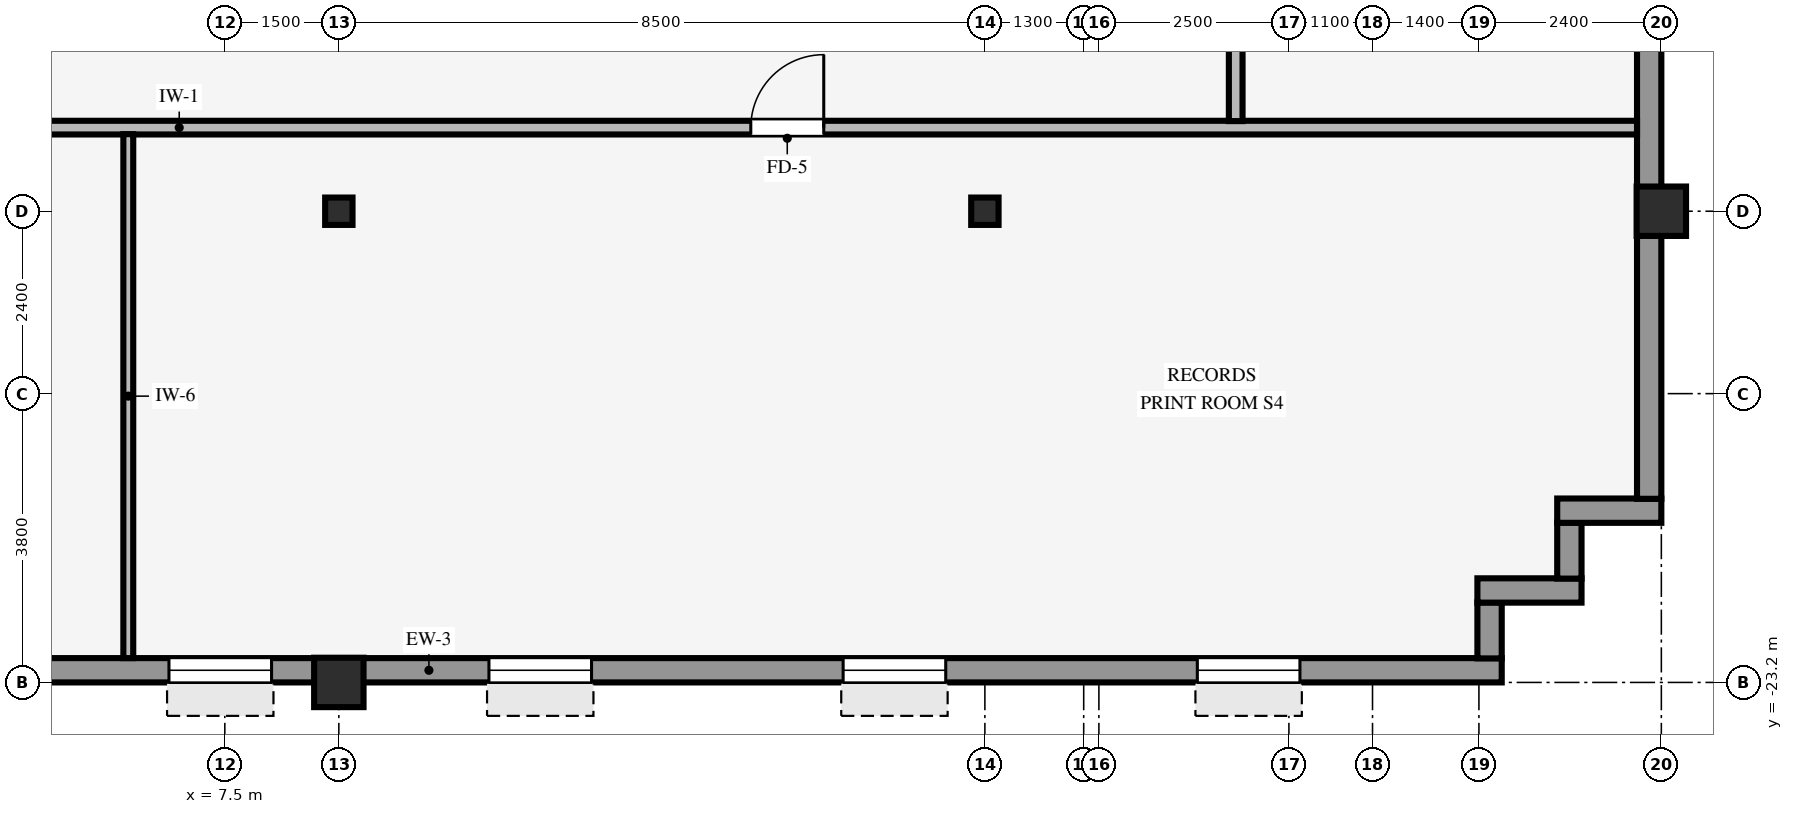
"""IFC4 building model, lengths in metres.
Left out: names, types, materials, properties, quantities, classifications, styles, units other than length and angle.
Written with IfcOpenShell. Run it as: python <this file> out.ifc"""

import sys

from ifc_helpers import new_model, si_unit, direction, frame, frame_2d, origin, origin_2d, place, context, subcontext, project, spatial, rectangle, hollow_rectangle, i_section, extrude, source, transform, mapped, element, fill, save


model = new_model("IFC4")
c1 = context("Model", 3, precision=1e-05, world=origin(), true_north=direction((0.0, 1.0)))
c2 = subcontext(c1, "Body", "Model", "MODEL_VIEW")
j1 = project(units=[si_unit("LENGTHUNIT", "METRE"), si_unit("PLANEANGLEUNIT", "RADIAN")], contexts=[c1])
p1 = place(None, origin())
s1 = spatial("IfcSite", under=j1, at=p1, CompositionType="ELEMENT")
p2 = place(p1, origin())
s2 = spatial("IfcBuilding", under=s1, at=p2, CompositionType="ELEMENT")
p3 = place(p2, frame((0.0, 0.0, 149.4)))
s3 = spatial("IfcBuildingStorey", under=s2, at=p3, CompositionType="ELEMENT", Elevation=149.4)
for number, where, z_axis, x_axis in (
    (1, (26.4, -17.0, 0.0), (0.0, 0.0, 1.0), (1.0, 0.0, 0.0)),
    (2, (9.0, -23.2, 0.0), (0.0, 0.0, 1.0), (1.0, 0.0, 0.0)),
):
    element("IfcColumn", number, at=place(p3, frame(where, z_axis=z_axis, x_axis=x_axis)), inside=s3, PredefinedType="COLUMN", context=c2, shape_type="SweptSolid", body=[
        extrude(hollow_rectangle(XDim=0.65, YDim=0.65, WallThickness=0.04, InnerFilletRadius=0.04, OuterFilletRadius=0.08, at=origin_2d()), origin(), (0.0, 0.0, 1.0), 3.37),
    ])
for number, where, z_axis, x_axis in (
    (3, (9.0, -17.0, 0.0), (0.0, 0.0, 1.0), (1.0, 0.0, 0.0)),
    (4, (17.5, -17.0, 0.0), (0.0, 0.0, 1.0), (1.0, 0.0, 0.0)),
):
    element("IfcColumn", number, at=place(p3, frame(where, z_axis=z_axis, x_axis=x_axis)), inside=s3, PredefinedType="COLUMN", context=c2, shape_type="SweptSolid", body=[
        extrude(i_section(OverallWidth=0.36, OverallDepth=0.36, WebThickness=0.021, FlangeThickness=0.021, FilletRadius=0.018, at=origin_2d()), origin(), (0.0, 0.0, 1.0), 3.37),
    ])
p4 = place(p3, frame((-24.3, -23.04, 0.0), z_axis=(0.0, 0.0, 1.0), x_axis=(1.0, 0.0, 0.0)))
e5 = element("IfcWall", 5, at=p4, inside=s3, PredefinedType="STANDARD", context=c2, shape_type="SweptSolid", body=[
    extrude(rectangle(XDim=48.6, YDim=0.32, at=frame_2d((24.3, 0.0))), origin(), (0.0, 0.0, 1.0), 2.705),
])
p5 = place(p4, frame((19.95, 0.0, 0.0), z_axis=(0.0, 0.0, 1.0), x_axis=(-1.0, 0.0, 0.0)))
e6 = element("IfcOpeningElement", 6, at=p5, cuts=e5, PredefinedType="OPENING", context=c2, shape_type="SweptSolid", body=[
    extrude(rectangle(XDim=1.05, YDim=2.1, at=frame_2d((0.525, 1.05))), frame((0.0, 0.17, 0.0), z_axis=(0.0, -1.0, 0.0), x_axis=(1.0, 0.0, 0.0)), (0.0, 0.0, 1.0), 0.34),
])
p6 = place(p4, frame((2.655, 0.0, 0.8)))
e7 = element("IfcOpeningElement", 7, at=p6, cuts=e5, PredefinedType="OPENING", context=c2, shape_type="SweptSolid", body=[
    extrude(rectangle(XDim=1.35, YDim=1.56, at=frame_2d((0.675, 0.78))), frame((0.0, 0.17, 0.0), z_axis=(0.0, -1.0, 0.0), x_axis=(1.0, 0.0, 0.0)), (0.0, 0.0, 1.0), 0.34),
])
p7 = place(p4, frame((7.315, 0.0, 0.8)))
e8 = element("IfcOpeningElement", 8, at=p7, cuts=e5, PredefinedType="OPENING", context=c2, shape_type="SweptSolid", body=[
    extrude(rectangle(XDim=1.35, YDim=1.56, at=frame_2d((0.675, 0.78))), frame((0.0, 0.17, 0.0), z_axis=(0.0, -1.0, 0.0), x_axis=(1.0, 0.0, 0.0)), (0.0, 0.0, 1.0), 0.34),
])
p8 = place(p4, frame((11.975, 0.0, 0.8)))
e9 = element("IfcOpeningElement", 9, at=p8, cuts=e5, PredefinedType="OPENING", context=c2, shape_type="SweptSolid", body=[
    extrude(rectangle(XDim=1.35, YDim=1.56, at=frame_2d((0.675, 0.78))), frame((0.0, 0.17, 0.0), z_axis=(0.0, -1.0, 0.0), x_axis=(1.0, 0.0, 0.0)), (0.0, 0.0, 1.0), 0.34),
])
p9 = place(p4, frame((21.295, 0.0, 0.8)))
e10 = element("IfcOpeningElement", 10, at=p9, cuts=e5, PredefinedType="OPENING", context=c2, shape_type="SweptSolid", body=[
    extrude(rectangle(XDim=1.35, YDim=1.56, at=frame_2d((0.675, 0.78))), frame((0.0, 0.17, 0.0), z_axis=(0.0, -1.0, 0.0), x_axis=(1.0, 0.0, 0.0)), (0.0, 0.0, 1.0), 0.34),
])
p10 = place(p4, frame((25.955, 0.0, 0.8)))
e11 = element("IfcOpeningElement", 11, at=p10, cuts=e5, PredefinedType="OPENING", context=c2, shape_type="SweptSolid", body=[
    extrude(rectangle(XDim=1.35, YDim=1.56, at=frame_2d((0.675, 0.78))), frame((0.0, 0.17, 0.0), z_axis=(0.0, -1.0, 0.0), x_axis=(1.0, 0.0, 0.0)), (0.0, 0.0, 1.0), 0.34),
])
p11 = place(p4, frame((31.065, 0.0, 0.8)))
e12 = element("IfcOpeningElement", 12, at=p11, cuts=e5, PredefinedType="OPENING", context=c2, shape_type="SweptSolid", body=[
    extrude(rectangle(XDim=1.35, YDim=1.56, at=frame_2d((0.675, 0.78))), frame((0.0, 0.17, 0.0), z_axis=(0.0, -1.0, 0.0), x_axis=(1.0, 0.0, 0.0)), (0.0, 0.0, 1.0), 0.34),
])
p12 = place(p4, frame((35.275, 0.0, 0.8)))
e13 = element("IfcOpeningElement", 13, at=p12, cuts=e5, PredefinedType="OPENING", context=c2, shape_type="SweptSolid", body=[
    extrude(rectangle(XDim=1.35, YDim=1.56, at=frame_2d((0.675, 0.78))), frame((0.0, 0.17, 0.0), z_axis=(0.0, -1.0, 0.0), x_axis=(1.0, 0.0, 0.0)), (0.0, 0.0, 1.0), 0.34),
])
p13 = place(p4, frame((39.935, 0.0, 0.8)))
e14 = element("IfcOpeningElement", 14, at=p13, cuts=e5, PredefinedType="OPENING", context=c2, shape_type="SweptSolid", body=[
    extrude(rectangle(XDim=1.35, YDim=1.56, at=frame_2d((0.675, 0.78))), frame((0.0, 0.17, 0.0), z_axis=(0.0, -1.0, 0.0), x_axis=(1.0, 0.0, 0.0)), (0.0, 0.0, 1.0), 0.34),
])
p14 = place(p4, frame((44.595, 0.0, 0.8)))
e15 = element("IfcOpeningElement", 15, at=p14, cuts=e5, PredefinedType="OPENING", context=c2, shape_type="SweptSolid", body=[
    extrude(rectangle(XDim=1.35, YDim=1.56, at=frame_2d((0.675, 0.78))), frame((0.0, 0.17, 0.0), z_axis=(0.0, -1.0, 0.0), x_axis=(1.0, 0.0, 0.0)), (0.0, 0.0, 1.0), 0.34),
])
p15 = place(p3, frame((24.14, -22.884, 0.0), z_axis=(0.0, 0.0, 1.0), x_axis=(0.0, 1.0, 0.0)))
e16 = element("IfcWall", 16, at=p15, inside=s3, PredefinedType="STANDARD", context=c2, shape_type="SweptSolid", body=[
    extrude(rectangle(XDim=0.738, YDim=0.32, at=frame_2d((0.369, 0.0))), origin(), (0.0, 0.0, 1.0), 3.36),
])
p16 = place(p3, frame((23.98, -21.99, 0.0), z_axis=(0.0, 0.0, 1.0), x_axis=(1.0, 0.0, 0.0)))
e17 = element("IfcWall", 17, at=p16, inside=s3, PredefinedType="STANDARD", context=c2, shape_type="SweptSolid", body=[
    extrude(rectangle(XDim=1.37, YDim=0.32, at=frame_2d((0.685, 0.0))), origin(), (0.0, 0.0, 1.0), 3.36),
])
p17 = place(p3, frame((25.19, -21.834, 0.0), z_axis=(0.0, 0.0, 1.0), x_axis=(0.0, 1.0, 0.0)))
e18 = element("IfcWall", 18, at=p17, inside=s3, PredefinedType="STANDARD", context=c2, shape_type="SweptSolid", body=[
    extrude(rectangle(XDim=0.738, YDim=0.32, at=frame_2d((0.369, 0.0))), origin(), (0.0, 0.0, 1.0), 3.36),
])
p18 = place(p3, frame((25.03, -20.94, 0.0), z_axis=(0.0, 0.0, 1.0), x_axis=(1.0, 0.0, 0.0)))
e19 = element("IfcWall", 19, at=p18, inside=s3, PredefinedType="STANDARD", context=c2, shape_type="SweptSolid", body=[
    extrude(rectangle(XDim=1.37, YDim=0.32, at=frame_2d((0.685, 0.0))), origin(), (0.0, 0.0, 1.0), 3.36),
])
p19 = place(p3, frame((26.24, -20.784, 0.0), z_axis=(0.0, 0.0, 1.0), x_axis=(0.0, 1.0, 0.0)))
e20 = element("IfcWall", 20, at=p19, inside=s3, PredefinedType="STANDARD", context=c2, shape_type="SweptSolid", body=[
    extrude(rectangle(XDim=41.568, YDim=0.32, at=frame_2d((20.784, 0.0))), origin(), (0.0, 0.0, 1.0), 2.705),
])
p20 = place(p19, frame((7.369, 0.0, 0.8)))
e21 = element("IfcOpeningElement", 21, at=p20, cuts=e20, PredefinedType="OPENING", context=c2, shape_type="SweptSolid", body=[
    extrude(rectangle(XDim=2.1, YDim=1.56, at=frame_2d((1.05, 0.78))), frame((0.0, 0.17, 0.0), z_axis=(0.0, -1.0, 0.0), x_axis=(1.0, 0.0, 0.0)), (0.0, 0.0, 1.0), 0.34),
])
p21 = place(p19, frame((12.315, 0.0, 0.8)))
e22 = element("IfcOpeningElement", 22, at=p21, cuts=e20, PredefinedType="OPENING", context=c2, shape_type="SweptSolid", body=[
    extrude(rectangle(XDim=2.1, YDim=1.56, at=frame_2d((1.05, 0.78))), frame((0.0, 0.17, 0.0), z_axis=(0.0, -1.0, 0.0), x_axis=(1.0, 0.0, 0.0)), (0.0, 0.0, 1.0), 0.34),
])
p22 = place(p19, frame((17.261, 0.0, 0.8)))
e23 = element("IfcOpeningElement", 23, at=p22, cuts=e20, PredefinedType="OPENING", context=c2, shape_type="SweptSolid", body=[
    extrude(rectangle(XDim=2.1, YDim=1.56, at=frame_2d((1.05, 0.78))), frame((0.0, 0.17, 0.0), z_axis=(0.0, -1.0, 0.0), x_axis=(1.0, 0.0, 0.0)), (0.0, 0.0, 1.0), 0.34),
])
p23 = place(p19, frame((22.207, 0.0, 0.8)))
e24 = element("IfcOpeningElement", 24, at=p23, cuts=e20, PredefinedType="OPENING", context=c2, shape_type="SweptSolid", body=[
    extrude(rectangle(XDim=2.1, YDim=1.56, at=frame_2d((1.05, 0.78))), frame((0.0, 0.17, 0.0), z_axis=(0.0, -1.0, 0.0), x_axis=(1.0, 0.0, 0.0)), (0.0, 0.0, 1.0), 0.34),
])
p24 = place(p19, frame((27.153, 0.0, 0.8)))
e25 = element("IfcOpeningElement", 25, at=p24, cuts=e20, PredefinedType="OPENING", context=c2, shape_type="SweptSolid", body=[
    extrude(rectangle(XDim=2.1, YDim=1.56, at=frame_2d((1.05, 0.78))), frame((0.0, 0.17, 0.0), z_axis=(0.0, -1.0, 0.0), x_axis=(1.0, 0.0, 0.0)), (0.0, 0.0, 1.0), 0.34),
])
p25 = place(p19, frame((32.099, 0.0, 0.8)))
e26 = element("IfcOpeningElement", 26, at=p25, cuts=e20, PredefinedType="OPENING", context=c2, shape_type="SweptSolid", body=[
    extrude(rectangle(XDim=2.1, YDim=1.56, at=frame_2d((1.05, 0.78))), frame((0.0, 0.17, 0.0), z_axis=(0.0, -1.0, 0.0), x_axis=(1.0, 0.0, 0.0)), (0.0, 0.0, 1.0), 0.34),
])
p26 = place(p3, frame((-26.08, -15.9, 0.0), z_axis=(0.0, 0.0, 1.0), x_axis=(1.0, 0.0, 0.0)))
e27 = element("IfcWall", 27, at=p26, inside=s3, PredefinedType="PARTITIONING", context=c2, shape_type="SweptSolid", body=[
    extrude(rectangle(XDim=52.16, YDim=0.18, at=frame_2d((26.08, 0.0))), origin(), (0.0, 0.0, 1.0), 3.36),
])
p27 = place(p26, frame((24.5, 0.0, 0.0)))
e28 = element("IfcOpeningElement", 28, at=p27, cuts=e27, PredefinedType="OPENING", context=c2, shape_type="SweptSolid", body=[
    extrude(rectangle(XDim=0.96, YDim=2.1, at=frame_2d((0.48, 1.05))), frame((0.0, 0.1, 0.0), z_axis=(0.0, -1.0, 0.0), x_axis=(1.0, 0.0, 0.0)), (0.0, 0.0, 1.0), 0.2),
])
p28 = place(p26, frame((40.5, 0.0, 0.0)))
e29 = element("IfcOpeningElement", 29, at=p28, cuts=e27, PredefinedType="OPENING", context=c2, shape_type="SweptSolid", body=[
    extrude(rectangle(XDim=0.96, YDim=2.1, at=frame_2d((0.48, 1.05))), frame((0.0, 0.1, 0.0), z_axis=(0.0, -1.0, 0.0), x_axis=(1.0, 0.0, 0.0)), (0.0, 0.0, 1.0), 0.2),
])
p29 = place(p26, frame((13.16, 0.0, 0.0)))
e30 = element("IfcOpeningElement", 30, at=p29, cuts=e27, PredefinedType="OPENING", context=c2, shape_type="SweptSolid", body=[
    extrude(rectangle(XDim=0.96, YDim=2.1, at=frame_2d((0.48, 1.05))), frame((0.0, 0.1, 0.0), z_axis=(0.0, -1.0, 0.0), x_axis=(1.0, 0.0, 0.0)), (0.0, 0.0, 1.0), 0.2),
])
p30 = place(p26, frame((6.425, 0.0, 0.0)))
e31 = element("IfcOpeningElement", 31, at=p30, cuts=e27, PredefinedType="OPENING", context=c2, shape_type="SweptSolid", body=[
    extrude(rectangle(XDim=0.96, YDim=2.1, at=frame_2d((0.48, 1.05))), frame((0.0, 0.1, 0.0), z_axis=(0.0, -1.0, 0.0), x_axis=(1.0, 0.0, 0.0)), (0.0, 0.0, 1.0), 0.2),
])
p31 = place(p3, frame((6.23, -22.88, 0.0), z_axis=(0.0, 0.0, 1.0), x_axis=(0.0, 1.0, 0.0)))
e32 = element("IfcWall", 32, at=p31, inside=s3, PredefinedType="PARTITIONING", context=c2, shape_type="SweptSolid", body=[
    extrude(rectangle(XDim=6.894, YDim=0.13, at=frame_2d((3.447, 0.0))), origin(), (0.0, 0.0, 1.0), 3.36),
])
p32 = place(p3, frame((20.8, -15.814, 0.0), z_axis=(0.0, 0.0, 1.0), x_axis=(0.0, 1.0, 0.0)))
e33 = element("IfcWall", 33, at=p32, inside=s3, PredefinedType="PARTITIONING", context=c2, shape_type="SweptSolid", body=[
    extrude(rectangle(XDim=2.228, YDim=0.18, at=frame_2d((1.114, 0.0))), origin(), (0.0, 0.0, 1.0), 3.36),
])
m1 = source(origin(), c2, "Body", "SweptSolid", [
    extrude(rectangle(XDim=1.35, YDim=1.56, at=frame_2d((0.675, 0.78))), frame((0.0, 0.03, 0.0), z_axis=(0.0, -1.0, 0.0), x_axis=(1.0, 0.0, 0.0)), (0.0, 0.0, 1.0), 0.06),
])
p33 = place(p11, origin())
e34 = element("IfcWindow", 34, at=p33, inside=s3, PartitioningType="SINGLE_PANEL", PredefinedType="WINDOW", context=c2, shape_type="MappedRepresentation", body=[
    mapped(m1, transform((0.0, 0.0, 0.0), scale=1.0)),
])
fill(e12, e34)
p34 = place(p12, origin())
e35 = element("IfcWindow", 35, at=p34, inside=s3, PartitioningType="SINGLE_PANEL", PredefinedType="WINDOW", context=c2, shape_type="MappedRepresentation", body=[
    mapped(m1, transform((0.0, 0.0, 0.0), scale=1.0)),
])
fill(e13, e35)
p35 = place(p13, origin())
e36 = element("IfcWindow", 36, at=p35, inside=s3, PartitioningType="SINGLE_PANEL", PredefinedType="WINDOW", context=c2, shape_type="MappedRepresentation", body=[
    mapped(m1, transform((0.0, 0.0, 0.0), scale=1.0)),
])
fill(e14, e36)
p36 = place(p14, origin())
e37 = element("IfcWindow", 37, at=p36, inside=s3, PartitioningType="SINGLE_PANEL", PredefinedType="WINDOW", context=c2, shape_type="MappedRepresentation", body=[
    mapped(m1, transform((0.0, 0.0, 0.0), scale=1.0)),
])
fill(e15, e37)
m2 = source(origin(), c2, "Body", "SweptSolid", [
    extrude(rectangle(XDim=0.96, YDim=2.1, at=frame_2d((0.48, 1.05))), frame((0.0, 0.025, 0.0), z_axis=(0.0, -1.0, 0.0), x_axis=(1.0, 0.0, 0.0)), (0.0, 0.0, 1.0), 0.05),
])
p37 = place(p28, origin())
e38 = element("IfcDoor", 38, at=p37, inside=s3, OperationType="SINGLE_SWING_RIGHT", PredefinedType="DOOR", context=c2, shape_type="MappedRepresentation", body=[
    mapped(m2, transform((0.0, 0.0, 0.0), scale=1.0)),
])
fill(e29, e38)
save(model, sys.argv[1])
